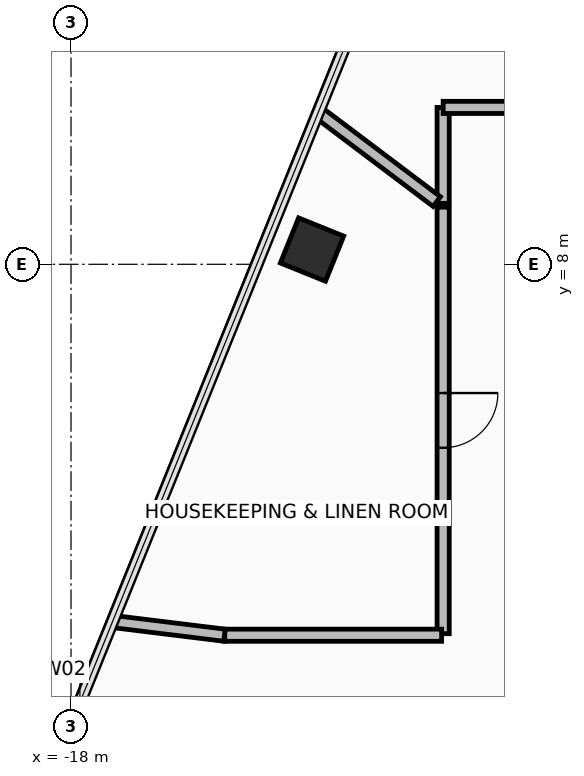
"""IFC4 building model, lengths in metres.
Left out: names, types, materials, properties, quantities, classifications, styles, units other than length and angle.
Written with IfcOpenShell. Run it as: python <this file> out.ifc"""

import sys

from ifc_helpers import new_model, si_unit, direction, frame, frame_2d, origin, origin_2d, place, context, subcontext, project, spatial, rectangle, hollow_rectangle, extrude, element, fill, save


model = new_model("IFC4")
c1 = context("Model", 3, precision=1e-05, world=origin(), true_north=direction((0.0, 1.0)))
c2 = subcontext(c1, "Body", "Model", "MODEL_VIEW")
j1 = project(units=[si_unit("LENGTHUNIT", "METRE"), si_unit("PLANEANGLEUNIT", "RADIAN")], contexts=[c1])
p1 = place(None, origin())
s1 = spatial("IfcSite", under=j1, at=p1, CompositionType="ELEMENT")
p2 = place(p1, origin())
s2 = spatial("IfcBuilding", under=s1, at=p2, CompositionType="ELEMENT")
p3 = place(p2, frame((0.0, 0.0, 74.2)))
s3 = spatial("IfcBuildingStorey", under=s2, at=p3, CompositionType="ELEMENT", Elevation=74.2)
p4 = place(p3, frame((-14.036, 8.242, 0.0), z_axis=(0.0, 0.0, 1.0), x_axis=(0.374608211656, 0.927183200754, 0.0)))
e1 = element("IfcColumn", 1, at=p4, inside=s3, PredefinedType="COLUMN", context=c2, shape_type="SweptSolid", body=[
    extrude(hollow_rectangle(XDim=0.8, YDim=0.8, WallThickness=0.045, at=origin_2d()), origin(), (0.0, 0.0, 1.0), 3.45),
])
p5 = place(p3, frame((-11.88, 10.579, 0.0), z_axis=(0.0, 0.0, 1.0), x_axis=(0.0, -1.0, 0.0)))
e2 = element("IfcWall", 2, at=p5, inside=s3, PredefinedType="PARTITIONING", context=c2, shape_type="SweptSolid", body=[
    extrude(rectangle(XDim=1.577, YDim=0.2, at=frame_2d((0.789, 0.0))), origin(), (0.0, 0.0, 1.0), 3.275),
])
p6 = place(p3, frame((-11.985, 9.031, 0.0), z_axis=(0.0, 0.0, 1.0), x_axis=(-0.798678535853, 0.601757921733, 0.0)))
e3 = element("IfcWall", 3, at=p6, inside=s3, PredefinedType="PARTITIONING", context=c2, shape_type="SweptSolid", body=[
    extrude(rectangle(XDim=2.42, YDim=0.2, at=frame_2d((1.21, 0.0))), origin(), (0.0, 0.0, 1.0), 2.47),
])
p7 = place(p3, frame((-4.529, 10.58, 0.0), z_axis=(0.0, 0.0, 1.0), x_axis=(-1.0, 0.0, 0.0)))
e4 = element("IfcWall", 4, at=p7, inside=s3, PredefinedType="PARTITIONING", context=c2, shape_type="SweptSolid", body=[
    extrude(rectangle(XDim=7.351, YDim=0.2, at=frame_2d((3.675, 0.0))), origin(), (0.0, 0.0, 1.0), 2.62),
])
p8 = place(p7, frame((3.075, 0.0, 0.0)))
e5 = element("IfcOpeningElement", 5, at=p8, cuts=e4, PredefinedType="OPENING", context=c2, shape_type="SweptSolid", body=[
    extrude(rectangle(XDim=1.2, YDim=2.15, at=frame_2d((0.6, 1.075))), frame((0.0, 0.11, 0.0), z_axis=(0.0, -1.0, 0.0), x_axis=(1.0, 0.0, 0.0)), (0.0, 0.0, 1.0), 0.22),
])
p9 = place(p3, frame((-11.88, 8.94, 0.0), z_axis=(0.0, 0.0, 1.0), x_axis=(0.0, -1.0, 0.0)))
e6 = element("IfcWall", 6, at=p9, inside=s3, PredefinedType="PARTITIONING", context=c2, shape_type="SweptSolid", body=[
    extrude(rectangle(XDim=7.015, YDim=0.2, at=frame_2d((3.507, 0.0))), origin(), (0.0, 0.0, 1.0), 2.67),
])
p10 = place(p9, frame((3.057, 0.0, 0.0)))
e7 = element("IfcOpeningElement", 7, at=p10, cuts=e6, PredefinedType="OPENING", context=c2, shape_type="SweptSolid", body=[
    extrude(rectangle(XDim=0.9, YDim=2.1, at=frame_2d((0.45, 1.05))), frame((0.0, 0.11, 0.0), z_axis=(0.0, -1.0, 0.0), x_axis=(1.0, 0.0, 0.0)), (0.0, 0.0, 1.0), 0.22),
])
p11 = place(p3, frame((-11.905, 1.9, 0.0), z_axis=(0.0, 0.0, 1.0), x_axis=(-1.0, 0.0, 0.0)))
e8 = element("IfcWall", 8, at=p11, inside=s3, PredefinedType="PARTITIONING", context=c2, shape_type="SweptSolid", body=[
    extrude(rectangle(XDim=3.568, YDim=0.2, at=frame_2d((1.784, 0.0))), origin(), (0.0, 0.0, 1.0), 2.87),
])
p12 = place(p3, frame((-15.476, 1.9, 0.0), z_axis=(0.0, 0.0, 1.0), x_axis=(-0.992540940143, 0.121911780153, 0.0)))
e9 = element("IfcWall", 9, at=p12, inside=s3, PredefinedType="PARTITIONING", context=c2, shape_type="SweptSolid", body=[
    extrude(rectangle(XDim=1.854, YDim=0.2, at=frame_2d((0.927, 0.0))), origin(), (0.0, 0.0, 1.0), 2.47),
])
p13 = place(p10, origin())
e10 = element("IfcDoor", 10, at=p13, inside=s3, OperationType="SINGLE_SWING_LEFT", PredefinedType="DOOR", context=c2, shape_type="SweptSolid", body=[
    extrude(rectangle(XDim=0.9, YDim=2.1, at=frame_2d((0.45, 1.05))), frame((0.0, 0.025, 0.0), z_axis=(0.0, -1.0, 0.0), x_axis=(1.0, 0.0, 0.0)), (0.0, 0.0, 1.0), 0.05),
])
fill(e7, e10)
save(model, sys.argv[1])
